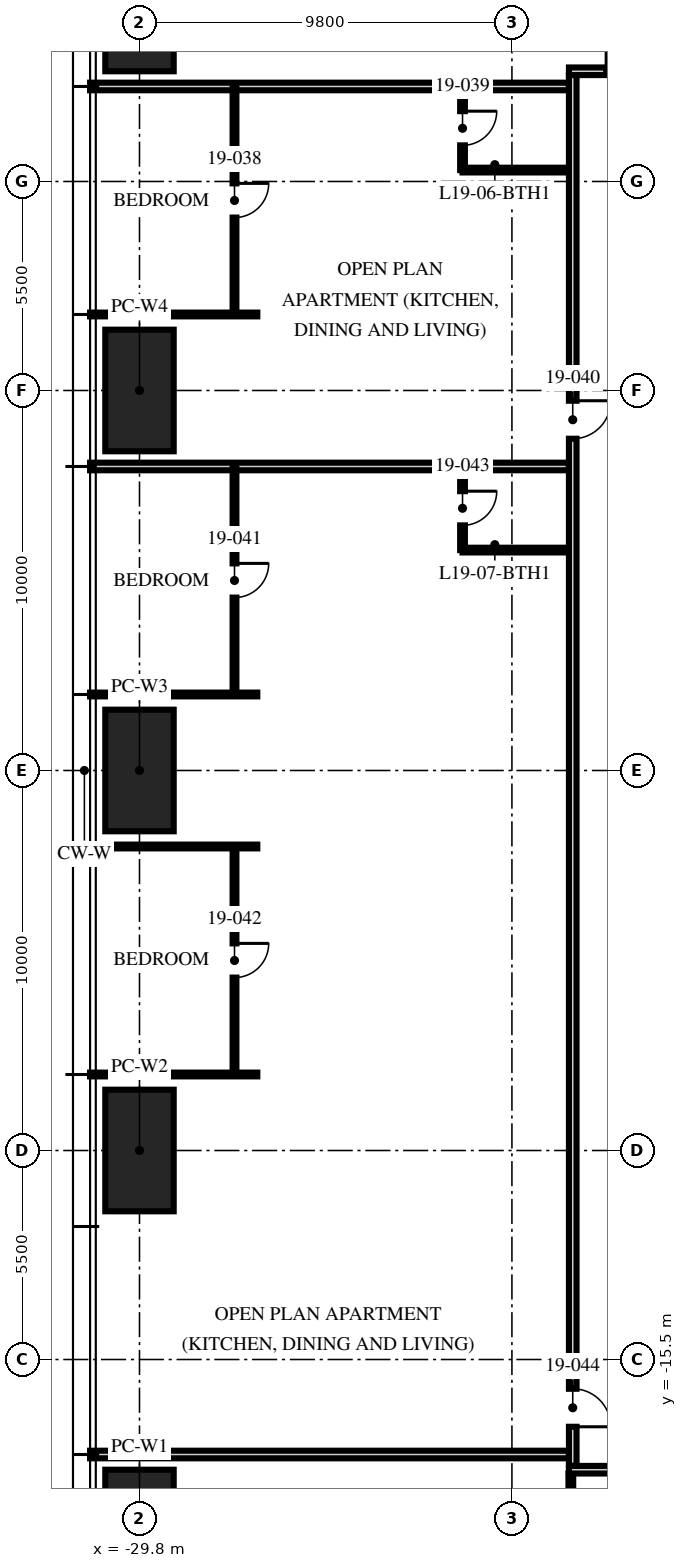
"""IFC4 building model, lengths in metres.
Left out: names, types, materials, properties, quantities, classifications, styles, units other than length and angle.
Written with IfcOpenShell. Run it as: python <this file> out.ifc"""

import sys

from ifc_helpers import new_model, si_unit, direction, frame, frame_2d, origin, origin_2d, place, context, subcontext, project, spatial, rectangle, hollow_rectangle, extrude, element, fill, save


model = new_model("IFC4")
c1 = context("Model", 3, precision=1e-05, world=origin(), true_north=direction((0.0, 1.0)))
c2 = subcontext(c1, "Body", "Model", "MODEL_VIEW")
j1 = project(units=[si_unit("LENGTHUNIT", "METRE"), si_unit("PLANEANGLEUNIT", "RADIAN")], contexts=[c1])
p1 = place(None, origin())
s1 = spatial("IfcSite", under=j1, at=p1, CompositionType="ELEMENT")
p2 = place(p1, origin())
s2 = spatial("IfcBuilding", under=s1, at=p2, CompositionType="ELEMENT")
p3 = place(p2, frame((0.0, 0.0, 77.25)))
s3 = spatial("IfcBuildingStorey", under=s2, at=p3, CompositionType="ELEMENT", Elevation=77.25)
for number, where, z_axis, x_axis in (
    (1, (-29.8, -20.0, 0.0), (0.0, 0.0, 1.0), (0.0, 1.0, 0.0)),
    (2, (-29.8, -10.0, 0.0), (0.0, 0.0, 1.0), (0.0, 1.0, 0.0)),
    (3, (-29.8, 0.0, 0.0), (0.0, 0.0, 1.0), (0.0, 1.0, 0.0)),
    (4, (-29.8, 10.0, 0.0), (0.0, 0.0, 1.0), (0.0, 1.0, 0.0)),
    (5, (-29.8, 20.0, 0.0), (0.0, 0.0, 1.0), (0.0, 1.0, 0.0)),
):
    element("IfcColumn", number, at=place(p3, frame(where, z_axis=z_axis, x_axis=x_axis)), inside=s3, PredefinedType="COLUMN", context=c2, shape_type="SweptSolid", body=[
        extrude(hollow_rectangle(XDim=3.2, YDim=1.8, WallThickness=0.2, at=origin_2d()), origin(), (0.0, 0.0, 1.0), 3.75),
    ])
p4 = place(p3, frame((-18.5, 18.0, 0.0), z_axis=(0.0, 0.0, 1.0), x_axis=(-1.0, 0.0, 0.0)))
e6 = element("IfcWall", 6, at=p4, inside=s3, PredefinedType="PARTITIONING", context=c2, shape_type="SweptSolid", body=[
    extrude(rectangle(XDim=12.6, YDim=0.2, at=frame_2d((6.3, 0.0))), origin(), (0.0, 0.0, 1.0), 2.3),
])
p5 = place(p3, frame((-26.7, 12.0, 0.0), z_axis=(0.0, 0.0, 1.0), x_axis=(-1.0, 0.0, 0.0)))
e7 = element("IfcWall", 7, at=p5, inside=s3, PredefinedType="PARTITIONING", context=c2, shape_type="SweptSolid", body=[
    extrude(rectangle(XDim=4.4, YDim=0.1, at=frame_2d((2.2, 0.0))), origin(), (0.0, 0.0, 1.0), 2.71),
])
p6 = place(p3, frame((-18.5, 8.0, 0.0), z_axis=(0.0, 0.0, 1.0), x_axis=(-1.0, 0.0, 0.0)))
e8 = element("IfcWall", 8, at=p6, inside=s3, PredefinedType="PARTITIONING", context=c2, shape_type="SweptSolid", body=[
    extrude(rectangle(XDim=12.6, YDim=0.2, at=frame_2d((6.3, 0.0))), origin(), (0.0, 0.0, 1.0), 2.71),
])
for number, where, z_axis, x_axis in (
    (9, (-26.7, 2.0, 0.0), (0.0, 0.0, 1.0), (-1.0, 0.0, 0.0)),
    (10, (-26.7, -2.0, 0.0), (0.0, 0.0, 1.0), (-1.0, 0.0, 0.0)),
    (11, (-26.7, -8.0, 0.0), (0.0, 0.0, 1.0), (-1.0, 0.0, 0.0)),
):
    element("IfcWall", number, at=place(p3, frame(where, z_axis=z_axis, x_axis=x_axis)), inside=s3, PredefinedType="PARTITIONING", context=c2, shape_type="SweptSolid", body=[
        extrude(rectangle(XDim=4.4, YDim=0.1, at=frame_2d((2.2, 0.0))), origin(), (0.0, 0.0, 1.0), 2.71),
    ])
p7 = place(p3, frame((-18.5, -18.0, 0.0), z_axis=(0.0, 0.0, 1.0), x_axis=(-1.0, 0.0, 0.0)))
e12 = element("IfcWall", 12, at=p7, inside=s3, PredefinedType="PARTITIONING", context=c2, shape_type="SweptSolid", body=[
    extrude(rectangle(XDim=12.6, YDim=0.2, at=frame_2d((6.3, 0.0))), origin(), (0.0, 0.0, 1.0), 2.3),
])
p8 = place(p3, frame((-27.3, 18.0, 0.0), z_axis=(0.0, 0.0, 1.0), x_axis=(0.0, -1.0, 0.0)))
e13 = element("IfcWall", 13, at=p8, inside=s3, PredefinedType="PARTITIONING", context=c2, shape_type="SweptSolid", body=[
    extrude(rectangle(XDim=6.0, YDim=0.1, at=frame_2d((3.0, 0.0))), origin(), (0.0, 0.0, 1.0), 2.61),
])
p9 = place(p8, frame((2.55, 0.0, 0.0)))
e14 = element("IfcOpeningElement", 14, at=p9, cuts=e13, PredefinedType="OPENING", context=c2, shape_type="SweptSolid", body=[
    extrude(rectangle(XDim=0.9, YDim=2.1, at=frame_2d((0.45, 1.05))), frame((0.0, 0.06, 0.0), z_axis=(0.0, -1.0, 0.0), x_axis=(1.0, 0.0, 0.0)), (0.0, 0.0, 1.0), 0.12),
])
p10 = place(p3, frame((-21.3, 18.0, 0.0), z_axis=(0.0, 0.0, 1.0), x_axis=(0.0, -1.0, 0.0)))
e15 = element("IfcWall", 15, at=p10, inside=s3, PredefinedType="PARTITIONING", context=c2, shape_type="SweptSolid", body=[
    extrude(rectangle(XDim=2.2, YDim=0.125, at=frame_2d((1.1, 0.0))), origin(), (0.0, 0.0, 1.0), 3.5),
])
p11 = place(p10, frame((0.65, 0.0, 0.0)))
e16 = element("IfcOpeningElement", 16, at=p11, cuts=e15, PredefinedType="OPENING", context=c2, shape_type="SweptSolid", body=[
    extrude(rectangle(XDim=0.9, YDim=2.1, at=frame_2d((0.45, 1.05))), frame((0.0, 0.073, 0.0), z_axis=(0.0, -1.0, 0.0), x_axis=(1.0, 0.0, 0.0)), (0.0, 0.0, 1.0), 0.145),
])
p12 = place(p3, frame((-18.5, 15.8, 0.0), z_axis=(0.0, 0.0, 1.0), x_axis=(-1.0, 0.0, 0.0)))
e17 = element("IfcWall", 17, at=p12, inside=s3, PredefinedType="PARTITIONING", context=c2, shape_type="SweptSolid", body=[
    extrude(rectangle(XDim=2.8, YDim=0.125, at=frame_2d((1.4, 0.0))), origin(), (0.0, 0.0, 1.0), 3.5),
])
p13 = place(p3, frame((-27.3, 8.0, 0.0), z_axis=(0.0, 0.0, 1.0), x_axis=(0.0, -1.0, 0.0)))
e18 = element("IfcWall", 18, at=p13, inside=s3, PredefinedType="PARTITIONING", context=c2, shape_type="SweptSolid", body=[
    extrude(rectangle(XDim=6.0, YDim=0.1, at=frame_2d((3.0, 0.0))), origin(), (0.0, 0.0, 1.0), 2.61),
])
p14 = place(p13, frame((2.55, 0.0, 0.0)))
e19 = element("IfcOpeningElement", 19, at=p14, cuts=e18, PredefinedType="OPENING", context=c2, shape_type="SweptSolid", body=[
    extrude(rectangle(XDim=0.9, YDim=2.1, at=frame_2d((0.45, 1.05))), frame((0.0, 0.06, 0.0), z_axis=(0.0, -1.0, 0.0), x_axis=(1.0, 0.0, 0.0)), (0.0, 0.0, 1.0), 0.12),
])
p15 = place(p3, frame((-27.3, -2.0, 0.0), z_axis=(0.0, 0.0, 1.0), x_axis=(0.0, -1.0, 0.0)))
e20 = element("IfcWall", 20, at=p15, inside=s3, PredefinedType="PARTITIONING", context=c2, shape_type="SweptSolid", body=[
    extrude(rectangle(XDim=6.0, YDim=0.1, at=frame_2d((3.0, 0.0))), origin(), (0.0, 0.0, 1.0), 2.61),
])
p16 = place(p15, frame((2.55, 0.0, 0.0)))
e21 = element("IfcOpeningElement", 21, at=p16, cuts=e20, PredefinedType="OPENING", context=c2, shape_type="SweptSolid", body=[
    extrude(rectangle(XDim=0.9, YDim=2.1, at=frame_2d((0.45, 1.05))), frame((0.0, 0.06, 0.0), z_axis=(0.0, -1.0, 0.0), x_axis=(1.0, 0.0, 0.0)), (0.0, 0.0, 1.0), 0.12),
])
p17 = place(p3, frame((-21.3, 8.0, 0.0), z_axis=(0.0, 0.0, 1.0), x_axis=(0.0, -1.0, 0.0)))
e22 = element("IfcWall", 22, at=p17, inside=s3, PredefinedType="PARTITIONING", context=c2, shape_type="SweptSolid", body=[
    extrude(rectangle(XDim=2.2, YDim=0.125, at=frame_2d((1.1, 0.0))), origin(), (0.0, 0.0, 1.0), 3.5),
])
p18 = place(p17, frame((0.65, 0.0, 0.0)))
e23 = element("IfcOpeningElement", 23, at=p18, cuts=e22, PredefinedType="OPENING", context=c2, shape_type="SweptSolid", body=[
    extrude(rectangle(XDim=0.9, YDim=2.1, at=frame_2d((0.45, 1.05))), frame((0.0, 0.073, 0.0), z_axis=(0.0, -1.0, 0.0), x_axis=(1.0, 0.0, 0.0)), (0.0, 0.0, 1.0), 0.145),
])
p19 = place(p3, frame((-18.5, 5.8, 0.0), z_axis=(0.0, 0.0, 1.0), x_axis=(-1.0, 0.0, 0.0)))
e24 = element("IfcWall", 24, at=p19, inside=s3, PredefinedType="PARTITIONING", context=c2, shape_type="SweptSolid", body=[
    extrude(rectangle(XDim=2.8, YDim=0.125, at=frame_2d((1.4, 0.0))), origin(), (0.0, 0.0, 1.0), 3.5),
])
p20 = place(p3, frame((-18.45, -18.5, 0.0), z_axis=(0.0, 0.0, 1.0), x_axis=(0.0, -1.0, 0.0)))
e25 = element("IfcWall", 25, at=p20, inside=s3, PredefinedType="PARTITIONING", context=c2, shape_type="SweptSolid", body=[
    extrude(rectangle(XDim=2.8, YDim=0.125, at=frame_2d((1.4, 0.0))), origin(), (0.0, 0.0, 1.0), 2.3),
])
p21 = place(p3, frame((-18.5, 18.4, 0.0), z_axis=(0.0, 0.0, 1.0), x_axis=(1.0, 0.0, 0.0)))
e26 = element("IfcWall", 26, at=p21, inside=s3, PredefinedType="PARTITIONING", context=c2, shape_type="SweptSolid", body=[
    extrude(rectangle(XDim=37.0, YDim=0.2, at=frame_2d((18.5, 0.0))), origin(), (0.0, 0.0, 1.0), 2.3),
])
p22 = place(p21, frame((20.93, 0.0, 0.0)))
e27 = element("IfcOpeningElement", 27, at=p22, cuts=e26, PredefinedType="OPENING", context=c2, shape_type="SweptSolid", body=[
    extrude(rectangle(XDim=1.0, YDim=2.2, at=frame_2d((0.5, 1.1))), frame((0.0, 0.11, 0.0), z_axis=(0.0, -1.0, 0.0), x_axis=(1.0, 0.0, 0.0)), (0.0, 0.0, 1.0), 0.22),
])
p23 = place(p21, frame((0.98, 0.0, 0.0)))
e28 = element("IfcOpeningElement", 28, at=p23, cuts=e26, PredefinedType="OPENING", context=c2, shape_type="SweptSolid", body=[
    extrude(rectangle(XDim=1.0, YDim=2.2, at=frame_2d((0.5, 1.1))), frame((0.0, 0.11, 0.0), z_axis=(0.0, -1.0, 0.0), x_axis=(1.0, 0.0, 0.0)), (0.0, 0.0, 1.0), 0.22),
])
p24 = place(p3, frame((-18.4, 18.3, 0.0), z_axis=(0.0, 0.0, 1.0), x_axis=(0.0, -1.0, 0.0)))
e29 = element("IfcWall", 29, at=p24, inside=s3, PredefinedType="PARTITIONING", context=c2, shape_type="SweptSolid", body=[
    extrude(rectangle(XDim=36.6, YDim=0.2, at=frame_2d((18.3, 0.0))), origin(), (0.0, 0.0, 1.0), 2.3),
])
p25 = place(p24, frame((8.57, 0.0, 0.0)))
e30 = element("IfcOpeningElement", 30, at=p25, cuts=e29, PredefinedType="OPENING", context=c2, shape_type="SweptSolid", body=[
    extrude(rectangle(XDim=1.0, YDim=2.2, at=frame_2d((0.5, 1.1))), frame((0.0, 0.11, 0.0), z_axis=(0.0, -1.0, 0.0), x_axis=(1.0, 0.0, 0.0)), (0.0, 0.0, 1.0), 0.22),
])
p26 = place(p24, frame((34.57, 0.0, 0.0)))
e31 = element("IfcOpeningElement", 31, at=p26, cuts=e29, PredefinedType="OPENING", context=c2, shape_type="SweptSolid", body=[
    extrude(rectangle(XDim=1.0, YDim=2.2, at=frame_2d((0.5, 1.1))), frame((0.0, 0.11, 0.0), z_axis=(0.0, -1.0, 0.0), x_axis=(1.0, 0.0, 0.0)), (0.0, 0.0, 1.0), 0.22),
])
p27 = place(p3, frame((-10.0, -18.4, 0.0), z_axis=(0.0, 0.0, 1.0), x_axis=(-1.0, 0.0, 0.0)))
e32 = element("IfcWall", 32, at=p27, inside=s3, PredefinedType="PARTITIONING", context=c2, shape_type="SweptSolid", body=[
    extrude(rectangle(XDim=8.5, YDim=0.2, at=frame_2d((4.25, 0.0))), origin(), (0.0, 0.0, 1.0), 2.3),
])
p28 = place(p23, origin())
e33 = element("IfcDoor", 33, at=p28, inside=s3, OperationType="SINGLE_SWING_LEFT", PredefinedType="DOOR", context=c2, shape_type="SweptSolid", body=[
    extrude(rectangle(XDim=1.0, YDim=2.2, at=frame_2d((0.5, 1.1))), frame((0.0, 0.025, 0.0), z_axis=(0.0, -1.0, 0.0), x_axis=(1.0, 0.0, 0.0)), (0.0, 0.0, 1.0), 0.05),
])
fill(e28, e33)
p29 = place(p9, origin())
e34 = element("IfcDoor", 34, at=p29, inside=s3, OperationType="SINGLE_SWING_LEFT", PredefinedType="DOOR", context=c2, shape_type="SweptSolid", body=[
    extrude(rectangle(XDim=0.9, YDim=2.1, at=frame_2d((0.45, 1.05))), frame((0.0, 0.025, 0.0), z_axis=(0.0, -1.0, 0.0), x_axis=(1.0, 0.0, 0.0)), (0.0, 0.0, 1.0), 0.05),
])
fill(e14, e34)
p30 = place(p11, origin())
e35 = element("IfcDoor", 35, at=p30, inside=s3, OperationType="SINGLE_SWING_LEFT", PredefinedType="DOOR", context=c2, shape_type="SweptSolid", body=[
    extrude(rectangle(XDim=0.9, YDim=2.1, at=frame_2d((0.45, 1.05))), frame((0.0, 0.025, 0.0), z_axis=(0.0, -1.0, 0.0), x_axis=(1.0, 0.0, 0.0)), (0.0, 0.0, 1.0), 0.05),
])
fill(e16, e35)
p31 = place(p25, origin())
e36 = element("IfcDoor", 36, at=p31, inside=s3, OperationType="SINGLE_SWING_LEFT", PredefinedType="DOOR", context=c2, shape_type="SweptSolid", body=[
    extrude(rectangle(XDim=1.0, YDim=2.2, at=frame_2d((0.5, 1.1))), frame((0.0, 0.025, 0.0), z_axis=(0.0, -1.0, 0.0), x_axis=(1.0, 0.0, 0.0)), (0.0, 0.0, 1.0), 0.05),
])
fill(e30, e36)
p32 = place(p14, origin())
e37 = element("IfcDoor", 37, at=p32, inside=s3, OperationType="SINGLE_SWING_LEFT", PredefinedType="DOOR", context=c2, shape_type="SweptSolid", body=[
    extrude(rectangle(XDim=0.9, YDim=2.1, at=frame_2d((0.45, 1.05))), frame((0.0, 0.025, 0.0), z_axis=(0.0, -1.0, 0.0), x_axis=(1.0, 0.0, 0.0)), (0.0, 0.0, 1.0), 0.05),
])
fill(e19, e37)
p33 = place(p16, origin())
e38 = element("IfcDoor", 38, at=p33, inside=s3, OperationType="SINGLE_SWING_LEFT", PredefinedType="DOOR", context=c2, shape_type="SweptSolid", body=[
    extrude(rectangle(XDim=0.9, YDim=2.1, at=frame_2d((0.45, 1.05))), frame((0.0, 0.025, 0.0), z_axis=(0.0, -1.0, 0.0), x_axis=(1.0, 0.0, 0.0)), (0.0, 0.0, 1.0), 0.05),
])
fill(e21, e38)
p34 = place(p18, origin())
e39 = element("IfcDoor", 39, at=p34, inside=s3, OperationType="SINGLE_SWING_LEFT", PredefinedType="DOOR", context=c2, shape_type="SweptSolid", body=[
    extrude(rectangle(XDim=0.9, YDim=2.1, at=frame_2d((0.45, 1.05))), frame((0.0, 0.025, 0.0), z_axis=(0.0, -1.0, 0.0), x_axis=(1.0, 0.0, 0.0)), (0.0, 0.0, 1.0), 0.05),
])
fill(e23, e39)
p35 = place(p26, origin())
e40 = element("IfcDoor", 40, at=p35, inside=s3, OperationType="SINGLE_SWING_RIGHT", PredefinedType="DOOR", context=c2, shape_type="SweptSolid", body=[
    extrude(rectangle(XDim=1.0, YDim=2.2, at=frame_2d((0.5, 1.1))), frame((0.0, 0.025, 0.0), z_axis=(0.0, -1.0, 0.0), x_axis=(1.0, 0.0, 0.0)), (0.0, 0.0, 1.0), 0.05),
])
fill(e31, e40)
save(model, sys.argv[1])
